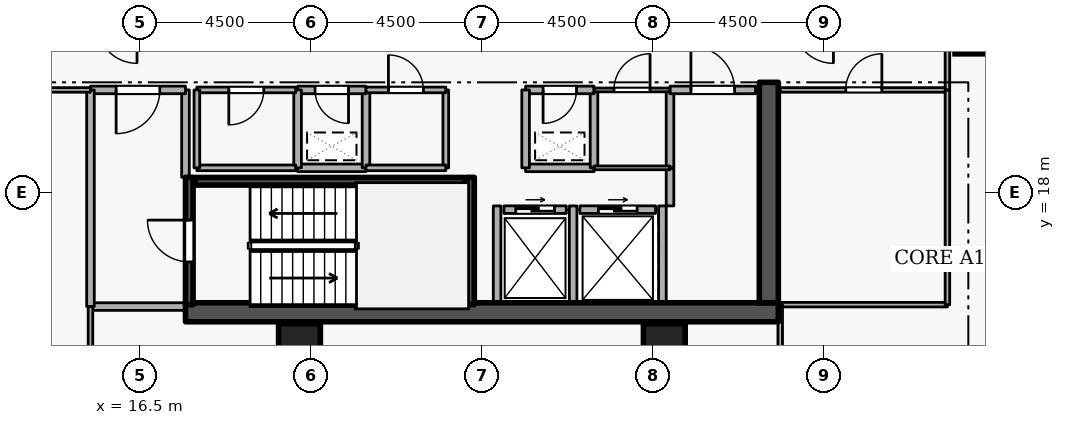
"""IFC4 building model, lengths in metres.
Left out: names, types, materials, properties, quantities, classifications, styles, units other than length and angle.
Written with IfcOpenShell. Run it as: python <this file> out.ifc"""

import sys

from ifc_helpers import new_model, si_unit, direction, frame, frame_2d, origin, origin_2d, place, context, subcontext, project, spatial, rectangle, extrude, element, fill, save


model = new_model("IFC4")
c1 = context("Model", 3, precision=1e-05, world=origin(), true_north=direction((0.0, 1.0)))
c2 = subcontext(c1, "Body", "Model", "MODEL_VIEW")
j1 = project(units=[si_unit("LENGTHUNIT", "METRE"), si_unit("PLANEANGLEUNIT", "RADIAN")], contexts=[c1])
p1 = place(None, origin())
s1 = spatial("IfcSite", under=j1, at=p1, CompositionType="ELEMENT")
p2 = place(p1, origin())
s2 = spatial("IfcBuilding", under=s1, at=p2, CompositionType="ELEMENT")
p3 = place(p2, frame((0.0, 0.0, 178.5)))
s3 = spatial("IfcBuildingStorey", under=s2, at=p3, CompositionType="ELEMENT", Elevation=178.5)
p4 = place(p3, frame((17.7, 14.85, 0.0), z_axis=(0.0, 0.0, 1.0), x_axis=(1.0, 0.0, 0.0)))
e1 = element("IfcWall", 1, at=p4, inside=s3, PredefinedType="SHEAR", context=c2, shape_type="SweptSolid", body=[
    extrude(rectangle(XDim=15.6, YDim=0.5, at=frame_2d((7.8, 0.0))), origin(), (0.0, 0.0, 1.0), 3.6),
])
p5 = place(p3, frame((33.05, 15.1, 0.0), z_axis=(0.0, 0.0, 1.0), x_axis=(0.0, 1.0, 0.0)))
e2 = element("IfcWall", 2, at=p5, inside=s3, PredefinedType="SHEAR", context=c2, shape_type="SweptSolid", body=[
    extrude(rectangle(XDim=5.8, YDim=0.5, at=frame_2d((2.9, 0.0))), origin(), (0.0, 0.0, 1.0), 3.6),
])
for number, where, z_axis, x_axis in (
    (3, (38.5, 22.2, 0.0), (0.0, 0.0, 1.0), (1.0, 0.0, 0.0)),
    (4, (20.7, 14.0, 0.0), (0.0, 0.0, 1.0), (1.0, 0.0, 0.0)),
    (5, (30.3, 14.0, 0.0), (0.0, 0.0, 1.0), (1.0, 0.0, 0.0)),
):
    element("IfcColumn", number, at=place(p3, frame(where, z_axis=z_axis, x_axis=x_axis)), inside=s3, PredefinedType="COLUMN", context=c2, shape_type="SweptSolid", body=[
        extrude(rectangle(XDim=1.1, YDim=1.1, at=origin_2d()), origin(), (0.0, 0.0, 1.0), 3.6),
    ])
p6 = place(p3, frame((26.08, 17.55, 0.0), z_axis=(0.0, 0.0, 1.0), x_axis=(1.0, 0.0, 0.0)))
e6 = element("IfcWall", 6, at=p6, inside=s3, PredefinedType="STANDARD", context=c2, shape_type="SweptSolid", body=[
    extrude(rectangle(XDim=1.64, YDim=0.2, at=frame_2d((0.82, 0.0))), origin(), (0.0, 0.0, 1.0), 3.34),
])
p7 = place(p6, frame((0.31, 0.0, 0.0)))
e7 = element("IfcOpeningElement", 7, at=p7, cuts=e6, PredefinedType="OPENING", context=c2, shape_type="SweptSolid", body=[
    extrude(rectangle(XDim=1.02, YDim=2.06, at=frame_2d((0.51, 1.03))), frame((0.0, 0.11, 0.0), z_axis=(0.0, -1.0, 0.0), x_axis=(1.0, 0.0, 0.0)), (0.0, 0.0, 1.0), 0.22),
])
p8 = place(p3, frame((28.08, 17.55, 0.0), z_axis=(0.0, 0.0, 1.0), x_axis=(1.0, 0.0, 0.0)))
e8 = element("IfcWall", 8, at=p8, inside=s3, PredefinedType="STANDARD", context=c2, shape_type="SweptSolid", body=[
    extrude(rectangle(XDim=1.99, YDim=0.2, at=frame_2d((0.995, 0.0))), origin(), (0.0, 0.0, 1.0), 3.34),
])
p9 = place(p8, frame((0.485, 0.0, 0.0)))
e9 = element("IfcOpeningElement", 9, at=p9, cuts=e8, PredefinedType="OPENING", context=c2, shape_type="SweptSolid", body=[
    extrude(rectangle(XDim=1.02, YDim=2.06, at=frame_2d((0.51, 1.03))), frame((0.0, 0.11, 0.0), z_axis=(0.0, -1.0, 0.0), x_axis=(1.0, 0.0, 0.0)), (0.0, 0.0, 1.0), 0.22),
])
for number, where, z_axis, x_axis in (
    (10, (27.9, 15.112, 0.0), (0.0, 0.0, 1.0), (0.0, 1.0, 0.0)),
    (11, (25.9, 15.112, 0.0), (0.0, 0.0, 1.0), (0.0, 1.0, 0.0)),
    (12, (30.25, 15.112, 0.0), (0.0, 0.0, 1.0), (0.0, 1.0, 0.0)),
):
    element("IfcWall", number, at=place(p3, frame(where, z_axis=z_axis, x_axis=x_axis)), inside=s3, PredefinedType="STANDARD", context=c2, shape_type="SweptSolid", body=[
        extrude(rectangle(XDim=2.536, YDim=0.2, at=frame_2d((1.268, 0.0))), origin(), (0.0, 0.0, 1.0), 3.34),
    ])
p10 = place(p3, frame((17.8, 15.05, 0.0), z_axis=(0.0, 0.0, 1.0), x_axis=(0.0, 1.0, 0.0)))
e13 = element("IfcWall", 13, at=p10, inside=s3, PredefinedType="SHEAR", context=c2, shape_type="SweptSolid", body=[
    extrude(rectangle(XDim=3.35, YDim=0.2, at=frame_2d((1.675, 0.0))), origin(), (0.0, 0.0, 1.0), 3.6),
])
p11 = place(p10, frame((1.125, 0.0, 0.0)))
e14 = element("IfcOpeningElement", 14, at=p11, cuts=e13, PredefinedType="OPENING", context=c2, shape_type="SweptSolid", body=[
    extrude(rectangle(XDim=1.1, YDim=2.1, at=frame_2d((0.55, 1.05))), frame((0.0, 0.11, 0.0), z_axis=(0.0, -1.0, 0.0), x_axis=(1.0, 0.0, 0.0)), (0.0, 0.0, 1.0), 0.22),
])
p12 = place(p3, frame((25.2, 18.4, 0.0), z_axis=(0.0, 0.0, 1.0), x_axis=(0.0, -1.0, 0.0)))
e15 = element("IfcWall", 15, at=p12, inside=s3, PredefinedType="SHEAR", context=c2, shape_type="SweptSolid", body=[
    extrude(rectangle(XDim=3.35, YDim=0.2, at=frame_2d((1.675, 0.0))), origin(), (0.0, 0.0, 1.0), 3.6),
])
p13 = place(p3, frame((25.05, 18.297, 0.0), z_axis=(0.0, 0.0, 1.0), x_axis=(-1.0, 0.0, 0.0)))
e16 = element("IfcWall", 16, at=p13, inside=s3, PredefinedType="SHEAR", context=c2, shape_type="SweptSolid", body=[
    extrude(rectangle(XDim=7.1, YDim=0.2, at=frame_2d((3.55, 0.0))), origin(), (0.0, 0.0, 1.0), 3.6),
])
p14 = place(p3, frame((15.2, 15.0, 0.0), z_axis=(0.0, 0.0, 1.0), x_axis=(1.0, 0.0, 0.0)))
e17 = element("IfcWall", 17, at=p14, inside=s3, PredefinedType="STANDARD", context=c2, shape_type="SweptSolid", body=[
    extrude(rectangle(XDim=2.5, YDim=0.2, at=frame_2d((1.25, 0.0))), origin(), (0.0, 0.0, 1.0), 3.34),
])
p15 = place(p3, frame((17.7, 18.4, 0.0), z_axis=(0.0, 0.0, 1.0), x_axis=(0.0, 1.0, 0.0)))
e18 = element("IfcWall", 18, at=p15, inside=s3, PredefinedType="STANDARD", context=c2, shape_type="SweptSolid", body=[
    extrude(rectangle(XDim=2.3, YDim=0.2, at=frame_2d((1.15, 0.0))), origin(), (0.0, 0.0, 1.0), 2.545),
])
p16 = place(p3, frame((17.7, 20.7, 0.0), z_axis=(0.0, 0.0, 1.0), x_axis=(-1.0, 0.0, 0.0)))
e19 = element("IfcWall", 19, at=p16, inside=s3, PredefinedType="STANDARD", context=c2, shape_type="SweptSolid", body=[
    extrude(rectangle(XDim=2.5, YDim=0.2, at=frame_2d((1.25, 0.0))), origin(), (0.0, 0.0, 1.0), 3.34),
])
p17 = place(p16, frame((0.675, 0.0, 0.0)))
e20 = element("IfcOpeningElement", 20, at=p17, cuts=e19, PredefinedType="OPENING", context=c2, shape_type="SweptSolid", body=[
    extrude(rectangle(XDim=1.15, YDim=2.1, at=frame_2d((0.575, 1.05))), frame((0.0, 0.11, 0.0), z_axis=(0.0, -1.0, 0.0), x_axis=(1.0, 0.0, 0.0)), (0.0, 0.0, 1.0), 0.22),
])
p18 = place(p3, frame((15.2, 20.7, 0.0), z_axis=(0.0, 0.0, 1.0), x_axis=(0.0, -1.0, 0.0)))
e21 = element("IfcWall", 21, at=p18, inside=s3, PredefinedType="STANDARD", context=c2, shape_type="SweptSolid", body=[
    extrude(rectangle(XDim=5.7, YDim=0.2, at=frame_2d((2.85, 0.0))), origin(), (0.0, 0.0, 1.0), 3.34),
])
p19 = place(p3, frame((26.65, 18.65, 0.0), z_axis=(0.0, 0.0, 1.0), x_axis=(1.0, 0.0, 0.0)))
e22 = element("IfcWall", 22, at=p19, inside=s3, PredefinedType="STANDARD", context=c2, shape_type="SweptSolid", body=[
    extrude(rectangle(XDim=1.8, YDim=0.2, at=frame_2d((0.9, 0.0))), origin(), (0.0, 0.0, 1.0), 3.34),
])
p20 = place(p3, frame((28.45, 18.65, 0.0), z_axis=(0.0, 0.0, 1.0), x_axis=(0.0, 1.0, 0.0)))
e23 = element("IfcWall", 23, at=p20, inside=s3, PredefinedType="STANDARD", context=c2, shape_type="SweptSolid", body=[
    extrude(rectangle(XDim=2.05, YDim=0.2, at=frame_2d((1.025, 0.0))), origin(), (0.0, 0.0, 1.0), 3.34),
])
p21 = place(p3, frame((28.45, 20.7, 0.0), z_axis=(0.0, 0.0, 1.0), x_axis=(-1.0, 0.0, 0.0)))
e24 = element("IfcWall", 24, at=p21, inside=s3, PredefinedType="STANDARD", context=c2, shape_type="SweptSolid", body=[
    extrude(rectangle(XDim=1.8, YDim=0.2, at=frame_2d((0.9, 0.0))), origin(), (0.0, 0.0, 1.0), 3.34),
])
p22 = place(p21, frame((0.46, 0.0, 0.0)))
e25 = element("IfcOpeningElement", 25, at=p22, cuts=e24, PredefinedType="OPENING", context=c2, shape_type="SweptSolid", body=[
    extrude(rectangle(XDim=0.88, YDim=2.04, at=frame_2d((0.44, 1.02))), frame((0.0, 0.11, 0.0), z_axis=(0.0, -1.0, 0.0), x_axis=(1.0, 0.0, 0.0)), (0.0, 0.0, 1.0), 0.22),
])
p23 = place(p3, frame((26.65, 20.7, 0.0), z_axis=(0.0, 0.0, 1.0), x_axis=(0.0, -1.0, 0.0)))
e26 = element("IfcWall", 26, at=p23, inside=s3, PredefinedType="STANDARD", context=c2, shape_type="SweptSolid", body=[
    extrude(rectangle(XDim=2.05, YDim=0.2, at=frame_2d((1.025, 0.0))), origin(), (0.0, 0.0, 1.0), 3.34),
])
p24 = place(p3, frame((20.65, 18.65, 0.0), z_axis=(0.0, 0.0, 1.0), x_axis=(1.0, 0.0, 0.0)))
e27 = element("IfcWall", 27, at=p24, inside=s3, PredefinedType="STANDARD", context=c2, shape_type="SweptSolid", body=[
    extrude(rectangle(XDim=1.8, YDim=0.2, at=frame_2d((0.9, 0.0))), origin(), (0.0, 0.0, 1.0), 3.34),
])
p25 = place(p3, frame((22.45, 18.65, 0.0), z_axis=(0.0, 0.0, 1.0), x_axis=(0.0, 1.0, 0.0)))
e28 = element("IfcWall", 28, at=p25, inside=s3, PredefinedType="STANDARD", context=c2, shape_type="SweptSolid", body=[
    extrude(rectangle(XDim=2.05, YDim=0.2, at=frame_2d((1.025, 0.0))), origin(), (0.0, 0.0, 1.0), 3.34),
])
p26 = place(p3, frame((22.45, 20.7, 0.0), z_axis=(0.0, 0.0, 1.0), x_axis=(-1.0, 0.0, 0.0)))
e29 = element("IfcWall", 29, at=p26, inside=s3, PredefinedType="STANDARD", context=c2, shape_type="SweptSolid", body=[
    extrude(rectangle(XDim=1.8, YDim=0.2, at=frame_2d((0.9, 0.0))), origin(), (0.0, 0.0, 1.0), 3.34),
])
p27 = place(p26, frame((0.46, 0.0, 0.0)))
e30 = element("IfcOpeningElement", 30, at=p27, cuts=e29, PredefinedType="OPENING", context=c2, shape_type="SweptSolid", body=[
    extrude(rectangle(XDim=0.88, YDim=2.04, at=frame_2d((0.44, 1.02))), frame((0.0, 0.11, 0.0), z_axis=(0.0, -1.0, 0.0), x_axis=(1.0, 0.0, 0.0)), (0.0, 0.0, 1.0), 0.22),
])
p28 = place(p3, frame((20.65, 20.7, 0.0), z_axis=(0.0, 0.0, 1.0), x_axis=(0.0, -1.0, 0.0)))
e31 = element("IfcWall", 31, at=p28, inside=s3, PredefinedType="STANDARD", context=c2, shape_type="SweptSolid", body=[
    extrude(rectangle(XDim=2.05, YDim=0.2, at=frame_2d((1.025, 0.0))), origin(), (0.0, 0.0, 1.0), 3.34),
])
p29 = place(p3, frame((30.45, 17.648, 0.0), z_axis=(0.0, 0.0, 1.0), x_axis=(0.0, 1.0, 0.0)))
e32 = element("IfcWall", 32, at=p29, inside=s3, PredefinedType="STANDARD", context=c2, shape_type="SweptSolid", body=[
    extrude(rectangle(XDim=1.002, YDim=0.2, at=frame_2d((0.501, 0.0))), origin(), (0.0, 0.0, 1.0), 3.34),
])
p30 = place(p3, frame((30.45, 18.65, 0.0), z_axis=(0.0, 0.0, 1.0), x_axis=(0.0, 1.0, 0.0)))
e33 = element("IfcWall", 33, at=p30, inside=s3, PredefinedType="STANDARD", context=c2, shape_type="SweptSolid", body=[
    extrude(rectangle(XDim=2.05, YDim=0.2, at=frame_2d((1.025, 0.0))), origin(), (0.0, 0.0, 1.0), 3.34),
])
p31 = place(p3, frame((30.45, 20.7, 0.0), z_axis=(0.0, 0.0, 1.0), x_axis=(1.0, 0.0, 0.0)))
e34 = element("IfcWall", 34, at=p31, inside=s3, PredefinedType="STANDARD", context=c2, shape_type="SweptSolid", body=[
    extrude(rectangle(XDim=2.25, YDim=0.2, at=frame_2d((1.125, 0.0))), origin(), (0.0, 0.0, 1.0), 3.34),
])
p32 = place(p31, frame((0.55, 0.0, 0.0)))
e35 = element("IfcOpeningElement", 35, at=p32, cuts=e34, PredefinedType="OPENING", context=c2, shape_type="SweptSolid", body=[
    extrude(rectangle(XDim=1.15, YDim=2.1, at=frame_2d((0.575, 1.05))), frame((0.0, 0.11, 0.0), z_axis=(0.0, -1.0, 0.0), x_axis=(1.0, 0.0, 0.0)), (0.0, 0.0, 1.0), 0.22),
])
p33 = place(p3, frame((18.0, 18.65, 0.0), z_axis=(0.0, 0.0, 1.0), x_axis=(1.0, 0.0, 0.0)))
e36 = element("IfcWall", 36, at=p33, inside=s3, PredefinedType="PARTITIONING", context=c2, shape_type="SweptSolid", body=[
    extrude(rectangle(XDim=2.6, YDim=0.15, at=frame_2d((1.3, 0.0))), origin(), (0.0, 0.0, 1.0), 3.34),
])
p34 = place(p3, frame((20.6, 20.7, 0.0), z_axis=(0.0, 0.0, 1.0), x_axis=(-1.0, 0.0, 0.0)))
e37 = element("IfcWall", 37, at=p34, inside=s3, PredefinedType="PARTITIONING", context=c2, shape_type="SweptSolid", body=[
    extrude(rectangle(XDim=2.6, YDim=0.15, at=frame_2d((1.3, 0.0))), origin(), (0.0, 0.0, 1.0), 3.34),
])
p35 = place(p34, frame((0.84, 0.0, 0.0)))
e38 = element("IfcOpeningElement", 38, at=p35, cuts=e37, PredefinedType="OPENING", context=c2, shape_type="SweptSolid", body=[
    extrude(rectangle(XDim=0.92, YDim=2.08, at=frame_2d((0.46, 1.04))), frame((0.0, 0.085, 0.0), z_axis=(0.0, -1.0, 0.0), x_axis=(1.0, 0.0, 0.0)), (0.0, 0.0, 1.0), 0.17),
])
p36 = place(p3, frame((18.0, 20.7, 0.0), z_axis=(0.0, 0.0, 1.0), x_axis=(0.0, -1.0, 0.0)))
e39 = element("IfcWall", 39, at=p36, inside=s3, PredefinedType="PARTITIONING", context=c2, shape_type="SweptSolid", body=[
    extrude(rectangle(XDim=2.05, YDim=0.15, at=frame_2d((1.025, 0.0))), origin(), (0.0, 0.0, 1.0), 2.545),
])
p37 = place(p3, frame((24.55, 20.7, 0.0), z_axis=(0.0, 0.0, 1.0), x_axis=(0.0, -1.0, 0.0)))
e40 = element("IfcWall", 40, at=p37, inside=s3, PredefinedType="PARTITIONING", context=c2, shape_type="SweptSolid", body=[
    extrude(rectangle(XDim=2.05, YDim=0.15, at=frame_2d((1.025, 0.0))), origin(), (0.0, 0.0, 1.0), 3.34),
])
p38 = place(p3, frame((24.55, 18.65, 0.0), z_axis=(0.0, 0.0, 1.0), x_axis=(-1.0, 0.0, 0.0)))
e41 = element("IfcWall", 41, at=p38, inside=s3, PredefinedType="PARTITIONING", context=c2, shape_type="SweptSolid", body=[
    extrude(rectangle(XDim=2.1, YDim=0.15, at=frame_2d((1.05, 0.0))), origin(), (0.0, 0.0, 1.0), 3.34),
])
p39 = place(p3, frame((22.45, 20.7, 0.0), z_axis=(0.0, 0.0, 1.0), x_axis=(1.0, 0.0, 0.0)))
e42 = element("IfcWall", 42, at=p39, inside=s3, PredefinedType="PARTITIONING", context=c2, shape_type="SweptSolid", body=[
    extrude(rectangle(XDim=2.1, YDim=0.15, at=frame_2d((1.05, 0.0))), origin(), (0.0, 0.0, 1.0), 3.34),
])
p40 = place(p39, frame((0.59, 0.0, 0.0)))
e43 = element("IfcOpeningElement", 43, at=p40, cuts=e42, PredefinedType="OPENING", context=c2, shape_type="SweptSolid", body=[
    extrude(rectangle(XDim=0.92, YDim=2.08, at=frame_2d((0.46, 1.04))), frame((0.0, 0.085, 0.0), z_axis=(0.0, -1.0, 0.0), x_axis=(1.0, 0.0, 0.0)), (0.0, 0.0, 1.0), 0.17),
])
p41 = place(p3, frame((30.45, 18.65, 0.0), z_axis=(0.0, 0.0, 1.0), x_axis=(-1.0, 0.0, 0.0)))
e44 = element("IfcWall", 44, at=p41, inside=s3, PredefinedType="PARTITIONING", context=c2, shape_type="SweptSolid", body=[
    extrude(rectangle(XDim=2.0, YDim=0.1, at=frame_2d((1.0, 0.0))), origin(), (0.0, 0.0, 1.0), 3.34),
])
p42 = place(p3, frame((28.45, 20.7, 0.0), z_axis=(0.0, 0.0, 1.0), x_axis=(1.0, 0.0, 0.0)))
e45 = element("IfcWall", 45, at=p42, inside=s3, PredefinedType="PARTITIONING", context=c2, shape_type="SweptSolid", body=[
    extrude(rectangle(XDim=2.0, YDim=0.1, at=frame_2d((1.0, 0.0))), origin(), (0.0, 0.0, 1.0), 3.34),
])
p43 = place(p42, frame((0.525, 0.0, 0.0)))
e46 = element("IfcOpeningElement", 46, at=p43, cuts=e45, PredefinedType="OPENING", context=c2, shape_type="SweptSolid", body=[
    extrude(rectangle(XDim=0.95, YDim=2.1, at=frame_2d((0.475, 1.05))), frame((0.0, 0.06, 0.0), z_axis=(0.0, -1.0, 0.0), x_axis=(1.0, 0.0, 0.0)), (0.0, 0.0, 1.0), 0.12),
])
p44 = place(p3, frame((37.75, 15.05, 0.0), z_axis=(0.0, 0.0, 1.0), x_axis=(-1.0, 0.0, 0.0)))
e47 = element("IfcWall", 47, at=p44, inside=s3, PredefinedType="PARTITIONING", context=c2, shape_type="SweptSolid", body=[
    extrude(rectangle(XDim=4.4, YDim=0.12, at=frame_2d((2.2, 0.0))), origin(), (0.0, 0.0, 1.0), 3.34),
])
p45 = place(p3, frame((33.35, 20.7, 0.0), z_axis=(0.0, 0.0, 1.0), x_axis=(1.0, 0.0, 0.0)))
e48 = element("IfcWall", 48, at=p45, inside=s3, PredefinedType="PARTITIONING", context=c2, shape_type="SweptSolid", body=[
    extrude(rectangle(XDim=4.4, YDim=0.12, at=frame_2d((2.2, 0.0))), origin(), (0.0, 0.0, 1.0), 3.34),
])
p46 = place(p45, frame((1.725, 0.0, 0.0)))
e49 = element("IfcOpeningElement", 49, at=p46, cuts=e48, PredefinedType="OPENING", context=c2, shape_type="SweptSolid", body=[
    extrude(rectangle(XDim=0.95, YDim=2.1, at=frame_2d((0.475, 1.05))), frame((0.0, 0.07, 0.0), z_axis=(0.0, -1.0, 0.0), x_axis=(1.0, 0.0, 0.0)), (0.0, 0.0, 1.0), 0.14),
])
p47 = place(p3, frame((37.75, 20.7, 0.0), z_axis=(0.0, 0.0, 1.0), x_axis=(0.0, -1.0, 0.0)))
e50 = element("IfcWall", 50, at=p47, inside=s3, PredefinedType="PARTITIONING", context=c2, shape_type="SweptSolid", body=[
    extrude(rectangle(XDim=5.65, YDim=0.12, at=frame_2d((2.825, 0.0))), origin(), (0.0, 0.0, 1.0), 3.34),
])
p48 = place(p3, frame((13.25, 20.7, 0.0), z_axis=(0.0, 0.0, 1.0), x_axis=(1.0, 0.0, 0.0)))
e51 = element("IfcWall", 51, at=p48, inside=s3, PredefinedType="PARTITIONING", context=c2, shape_type="SweptSolid", body=[
    extrude(rectangle(XDim=1.95, YDim=0.12, at=frame_2d((0.975, 0.0))), origin(), (0.0, 0.0, 1.0), 3.34),
])
p49 = place(p3, frame((15.2, 15.0, 0.0), z_axis=(0.0, 0.0, 1.0), x_axis=(0.0, -1.0, 0.0)))
e52 = element("IfcWall", 52, at=p49, inside=s3, PredefinedType="PARTITIONING", context=c2, shape_type="SweptSolid", body=[
    extrude(rectangle(XDim=5.72, YDim=0.12, at=frame_2d((2.86, 0.0))), origin(), (0.0, 0.0, 1.0), 3.34),
])
p50 = place(p3, frame((37.75, 20.7, 0.0), z_axis=(0.0, 0.0, 1.0), x_axis=(0.0, 1.0, 0.0)))
e53 = element("IfcWall", 53, at=p50, inside=s3, PredefinedType="PARTITIONING", context=c2, shape_type="SweptSolid", body=[
    extrude(rectangle(XDim=1.75, YDim=0.12, at=frame_2d((0.875, 0.0))), origin(), (0.0, 0.0, 1.0), 3.34),
])
p51 = place(p3, frame((33.35, 9.28, 0.0), z_axis=(0.0, 0.0, 1.0), x_axis=(0.0, 1.0, 0.0)))
e54 = element("IfcWall", 54, at=p51, inside=s3, PredefinedType="PARTITIONING", context=c2, shape_type="SweptSolid", body=[
    extrude(rectangle(XDim=5.77, YDim=0.12, at=frame_2d((2.885, 0.0))), origin(), (0.0, 0.0, 1.0), 2.545),
])
p52 = place(p7, origin())
e55 = element("IfcDoor", 55, at=p52, inside=s3, OperationType="SLIDING_TO_LEFT", PredefinedType="DOOR", context=c2, shape_type="SweptSolid", body=[
    extrude(rectangle(XDim=1.02, YDim=2.06, at=frame_2d((0.51, 1.03))), frame((0.0, 0.025, 0.0), z_axis=(0.0, -1.0, 0.0), x_axis=(1.0, 0.0, 0.0)), (0.0, 0.0, 1.0), 0.05),
])
fill(e7, e55)
p53 = place(p9, origin())
e56 = element("IfcDoor", 56, at=p53, inside=s3, OperationType="SLIDING_TO_LEFT", PredefinedType="DOOR", context=c2, shape_type="SweptSolid", body=[
    extrude(rectangle(XDim=1.02, YDim=2.06, at=frame_2d((0.51, 1.03))), frame((0.0, 0.025, 0.0), z_axis=(0.0, -1.0, 0.0), x_axis=(1.0, 0.0, 0.0)), (0.0, 0.0, 1.0), 0.05),
])
fill(e9, e56)
p54 = place(p11, origin())
e57 = element("IfcDoor", 57, at=p54, inside=s3, OperationType="SINGLE_SWING_RIGHT", PredefinedType="DOOR", context=c2, shape_type="SweptSolid", body=[
    extrude(rectangle(XDim=1.1, YDim=2.1, at=frame_2d((0.55, 1.05))), frame((0.0, 0.025, 0.0), z_axis=(0.0, -1.0, 0.0), x_axis=(1.0, 0.0, 0.0)), (0.0, 0.0, 1.0), 0.05),
])
fill(e14, e57)
p55 = place(p17, origin())
e58 = element("IfcDoor", 58, at=p55, inside=s3, OperationType="SINGLE_SWING_RIGHT", PredefinedType="DOOR", context=c2, shape_type="SweptSolid", body=[
    extrude(rectangle(XDim=1.15, YDim=2.1, at=frame_2d((0.575, 1.05))), frame((0.0, 0.025, 0.0), z_axis=(0.0, -1.0, 0.0), x_axis=(1.0, 0.0, 0.0)), (0.0, 0.0, 1.0), 0.05),
])
fill(e20, e58)
p56 = place(p22, origin())
e59 = element("IfcDoor", 59, at=p56, inside=s3, OperationType="SINGLE_SWING_RIGHT", PredefinedType="DOOR", context=c2, shape_type="SweptSolid", body=[
    extrude(rectangle(XDim=0.88, YDim=2.04, at=frame_2d((0.44, 1.02))), frame((0.0, 0.025, 0.0), z_axis=(0.0, -1.0, 0.0), x_axis=(1.0, 0.0, 0.0)), (0.0, 0.0, 1.0), 0.05),
])
fill(e25, e59)
p57 = place(p27, origin())
e60 = element("IfcDoor", 60, at=p57, inside=s3, OperationType="SINGLE_SWING_LEFT", PredefinedType="DOOR", context=c2, shape_type="SweptSolid", body=[
    extrude(rectangle(XDim=0.88, YDim=2.04, at=frame_2d((0.44, 1.02))), frame((0.0, 0.025, 0.0), z_axis=(0.0, -1.0, 0.0), x_axis=(1.0, 0.0, 0.0)), (0.0, 0.0, 1.0), 0.05),
])
fill(e30, e60)
p58 = place(p35, origin())
e61 = element("IfcDoor", 61, at=p58, inside=s3, OperationType="SINGLE_SWING_RIGHT", PredefinedType="DOOR", context=c2, shape_type="SweptSolid", body=[
    extrude(rectangle(XDim=0.92, YDim=2.08, at=frame_2d((0.46, 1.04))), frame((0.0, 0.025, 0.0), z_axis=(0.0, -1.0, 0.0), x_axis=(1.0, 0.0, 0.0)), (0.0, 0.0, 1.0), 0.05),
])
fill(e38, e61)
p59 = place(p40, origin())
e62 = element("IfcDoor", 62, at=p59, inside=s3, OperationType="SINGLE_SWING_LEFT", PredefinedType="DOOR", context=c2, shape_type="SweptSolid", body=[
    extrude(rectangle(XDim=0.92, YDim=2.08, at=frame_2d((0.46, 1.04))), frame((0.0, 0.025, 0.0), z_axis=(0.0, -1.0, 0.0), x_axis=(1.0, 0.0, 0.0)), (0.0, 0.0, 1.0), 0.05),
])
fill(e43, e62)
p60 = place(p43, origin())
e63 = element("IfcDoor", 63, at=p60, inside=s3, OperationType="SINGLE_SWING_RIGHT", PredefinedType="DOOR", context=c2, shape_type="SweptSolid", body=[
    extrude(rectangle(XDim=0.95, YDim=2.1, at=frame_2d((0.475, 1.05))), frame((0.0, 0.025, 0.0), z_axis=(0.0, -1.0, 0.0), x_axis=(1.0, 0.0, 0.0)), (0.0, 0.0, 1.0), 0.05),
])
fill(e46, e63)
p61 = place(p32, origin())
e64 = element("IfcDoor", 64, at=p61, inside=s3, OperationType="SINGLE_SWING_LEFT", PredefinedType="DOOR", context=c2, shape_type="SweptSolid", body=[
    extrude(rectangle(XDim=1.15, YDim=2.1, at=frame_2d((0.575, 1.05))), frame((0.0, 0.025, 0.0), z_axis=(0.0, -1.0, 0.0), x_axis=(1.0, 0.0, 0.0)), (0.0, 0.0, 1.0), 0.05),
])
fill(e35, e64)
p62 = place(p46, origin())
e65 = element("IfcDoor", 65, at=p62, inside=s3, OperationType="SINGLE_SWING_RIGHT", PredefinedType="DOOR", context=c2, shape_type="SweptSolid", body=[
    extrude(rectangle(XDim=0.95, YDim=2.1, at=frame_2d((0.475, 1.05))), frame((0.0, 0.025, 0.0), z_axis=(0.0, -1.0, 0.0), x_axis=(1.0, 0.0, 0.0)), (0.0, 0.0, 1.0), 0.05),
])
fill(e49, e65)
save(model, sys.argv[1])
